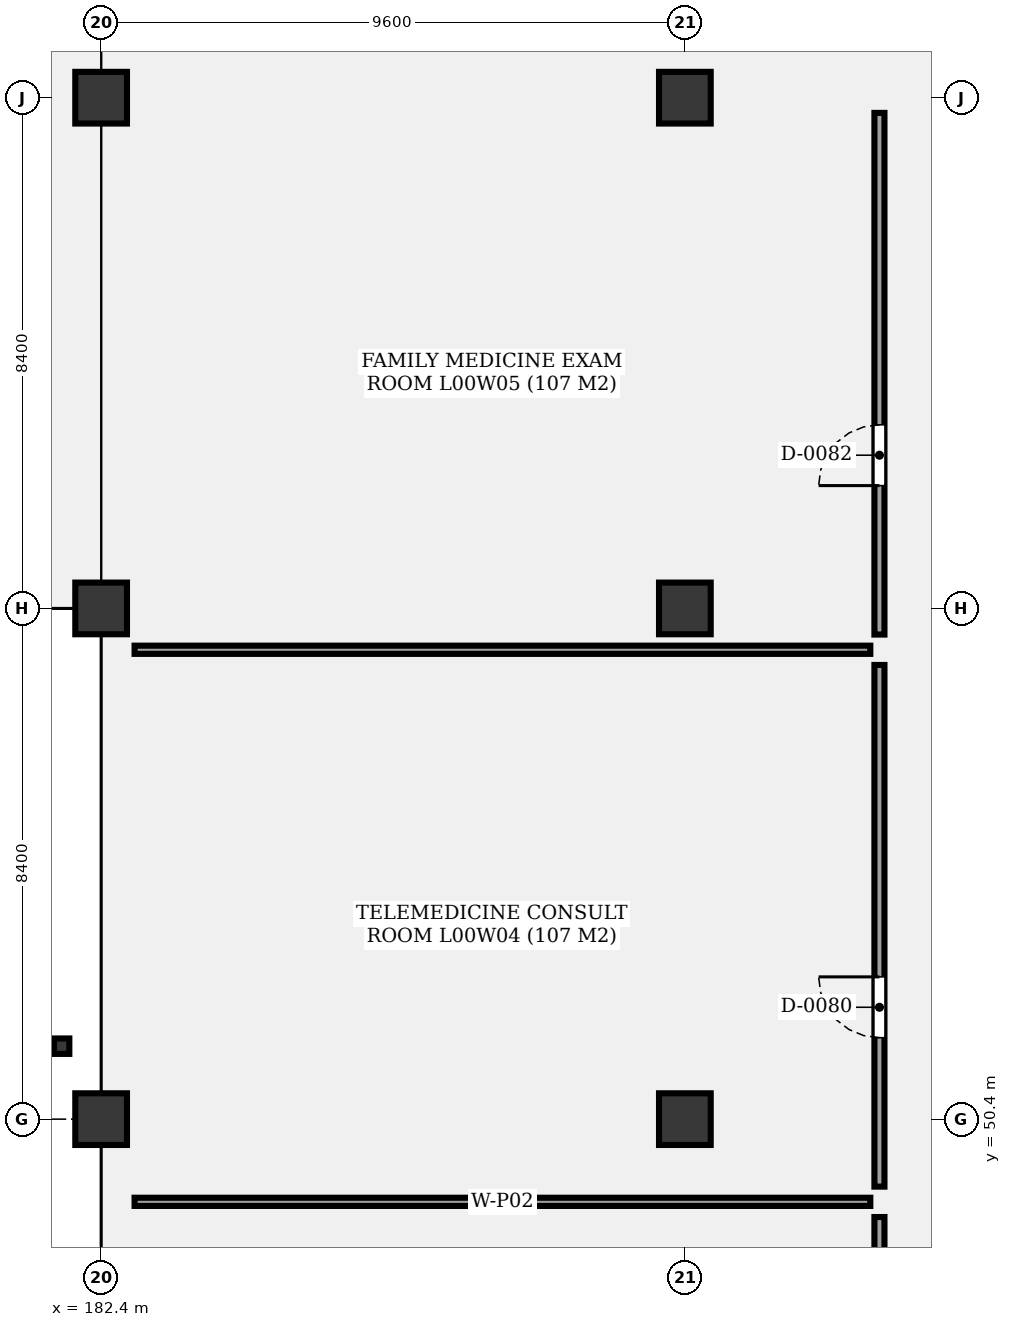
"""IFC4 building model, lengths in metres.
Left out: names, types, materials, properties, quantities, classifications, styles, units other than length and angle.
Written with IfcOpenShell. Run it as: python <this file> out.ifc"""

import sys

from ifc_helpers import new_model, si_unit, direction, frame, frame_2d, origin, origin_2d, place, context, subcontext, project, spatial, rectangle, hollow_rectangle, extrude, element, fill, save


model = new_model("IFC4")
c1 = context("Model", 3, precision=1e-05, world=origin(), true_north=direction((0.0, 1.0)))
c2 = subcontext(c1, "Body", "Model", "MODEL_VIEW")
j1 = project(units=[si_unit("LENGTHUNIT", "METRE"), si_unit("PLANEANGLEUNIT", "RADIAN")], contexts=[c1])
p1 = place(None, origin())
s1 = spatial("IfcSite", under=j1, at=p1, CompositionType="ELEMENT")
p2 = place(p1, origin())
s2 = spatial("IfcBuilding", under=s1, at=p2, CompositionType="ELEMENT")
p3 = place(p2, origin())
s3 = spatial("IfcBuildingStorey", under=s2, at=p3, CompositionType="ELEMENT", Elevation=0.0)
p4 = place(p3, frame((181.75, 51.6, -0.35), z_axis=(0.0, 0.0, 1.0), x_axis=(1.0, 0.0, 0.0)))
e1 = element("IfcColumn", 1, at=p4, inside=s3, PredefinedType="COLUMN", context=c2, shape_type="SweptSolid", body=[
    extrude(hollow_rectangle(XDim=0.254, YDim=0.254, WallThickness=0.013, at=origin_2d()), origin(), (0.0, 0.0, 1.0), 5.45),
])
for number, where, z_axis, x_axis in (
    (2, (182.4, 50.4, -0.35), (0.0, 0.0, 1.0), (1.0, 0.0, 0.0)),
    (3, (182.4, 58.8, -0.35), (0.0, 0.0, 1.0), (1.0, 0.0, 0.0)),
    (4, (182.4, 67.2, -0.35), (0.0, 0.0, 1.0), (1.0, 0.0, 0.0)),
    (5, (192.0, 50.4, -0.35), (0.0, 0.0, 1.0), (1.0, 0.0, 0.0)),
    (6, (192.0, 58.8, -0.35), (0.0, 0.0, 1.0), (1.0, 0.0, 0.0)),
    (7, (192.0, 67.2, -0.35), (0.0, 0.0, 1.0), (1.0, 0.0, 0.0)),
):
    element("IfcColumn", number, at=place(p3, frame(where, z_axis=z_axis, x_axis=x_axis)), inside=s3, PredefinedType="COLUMN", context=c2, shape_type="SweptSolid", body=[
        extrude(rectangle(XDim=0.85, YDim=0.85, at=origin_2d()), origin(), (0.0, 0.0, 1.0), 5.45),
    ])
p5 = place(p3, frame((195.2, 40.21, 0.0), z_axis=(0.0, 0.0, 1.0), x_axis=(0.0, 1.0, 0.0)))
e8 = element("IfcWall", 8, at=p5, inside=s3, PredefinedType="PARTITIONING", context=c2, shape_type="SweptSolid", body=[
    extrude(rectangle(XDim=8.58, YDim=0.165, at=frame_2d((4.29, 0.0))), origin(), (0.0, 0.0, 1.0), 3.98),
])
p6 = place(p5, frame((2.45, 0.0, 0.0)))
e9 = element("IfcOpeningElement", 9, at=p6, cuts=e8, PredefinedType="OPENING", context=c2, shape_type="SweptSolid", body=[
    extrude(rectangle(XDim=1.0, YDim=2.1, at=frame_2d((0.5, 1.05))), frame((0.0, 0.093, 0.0), z_axis=(0.0, -1.0, 0.0), x_axis=(1.0, 0.0, 0.0)), (0.0, 0.0, 1.0), 0.185),
])
p7 = place(p3, frame((195.2, 49.29, 0.0), z_axis=(0.0, 0.0, 1.0), x_axis=(0.0, 1.0, 0.0)))
e10 = element("IfcWall", 10, at=p7, inside=s3, PredefinedType="PARTITIONING", context=c2, shape_type="SweptSolid", body=[
    extrude(rectangle(XDim=8.58, YDim=0.165, at=frame_2d((4.29, 0.0))), origin(), (0.0, 0.0, 1.0), 3.98),
])
p8 = place(p7, frame((2.45, 0.0, 0.0)))
e11 = element("IfcOpeningElement", 11, at=p8, cuts=e10, PredefinedType="OPENING", context=c2, shape_type="SweptSolid", body=[
    extrude(rectangle(XDim=1.0, YDim=2.2, at=frame_2d((0.5, 1.1))), frame((0.0, 0.093, 0.0), z_axis=(0.0, -1.0, 0.0), x_axis=(1.0, 0.0, 0.0)), (0.0, 0.0, 1.0), 0.185),
])
p9 = place(p3, frame((182.95, 49.04, 0.0), z_axis=(0.0, 0.0, 1.0), x_axis=(1.0, 0.0, 0.0)))
e12 = element("IfcWall", 12, at=p9, inside=s3, PredefinedType="PARTITIONING", context=c2, shape_type="SweptSolid", body=[
    extrude(rectangle(XDim=12.1, YDim=0.135, at=frame_2d((6.05, 0.0))), origin(), (0.0, 0.0, 1.0), 3.98),
])
p10 = place(p3, frame((195.2, 58.37, 0.0), z_axis=(0.0, 0.0, 1.0), x_axis=(0.0, 1.0, 0.0)))
e13 = element("IfcWall", 13, at=p10, inside=s3, PredefinedType="PARTITIONING", context=c2, shape_type="SweptSolid", body=[
    extrude(rectangle(XDim=8.58, YDim=0.165, at=frame_2d((4.29, 0.0))), origin(), (0.0, 0.0, 1.0), 3.98),
])
p11 = place(p10, frame((2.45, 0.0, 0.0)))
e14 = element("IfcOpeningElement", 14, at=p11, cuts=e13, PredefinedType="OPENING", context=c2, shape_type="SweptSolid", body=[
    extrude(rectangle(XDim=1.0, YDim=2.1, at=frame_2d((0.5, 1.05))), frame((0.0, 0.093, 0.0), z_axis=(0.0, -1.0, 0.0), x_axis=(1.0, 0.0, 0.0)), (0.0, 0.0, 1.0), 0.185),
])
p12 = place(p3, frame((182.95, 58.12, 0.0), z_axis=(0.0, 0.0, 1.0), x_axis=(1.0, 0.0, 0.0)))
e15 = element("IfcWall", 15, at=p12, inside=s3, PredefinedType="PARTITIONING", context=c2, shape_type="SweptSolid", body=[
    extrude(rectangle(XDim=12.1, YDim=0.135, at=frame_2d((6.05, 0.0))), origin(), (0.0, 0.0, 1.0), 3.98),
])
p13 = place(p8, origin())
e16 = element("IfcDoor", 16, at=p13, inside=s3, OperationType="SINGLE_SWING_RIGHT", PredefinedType="DOOR", context=c2, shape_type="SweptSolid", body=[
    extrude(rectangle(XDim=1.0, YDim=2.2, at=frame_2d((0.5, 1.1))), frame((0.0, 0.025, 0.0), z_axis=(0.0, -1.0, 0.0), x_axis=(1.0, 0.0, 0.0)), (0.0, 0.0, 1.0), 0.05),
])
fill(e11, e16)
p14 = place(p11, origin())
e17 = element("IfcDoor", 17, at=p14, inside=s3, OperationType="SINGLE_SWING_LEFT", PredefinedType="DOOR", context=c2, shape_type="SweptSolid", body=[
    extrude(rectangle(XDim=1.0, YDim=2.1, at=frame_2d((0.5, 1.05))), frame((0.0, 0.025, 0.0), z_axis=(0.0, -1.0, 0.0), x_axis=(1.0, 0.0, 0.0)), (0.0, 0.0, 1.0), 0.05),
])
fill(e14, e17)
save(model, sys.argv[1])
